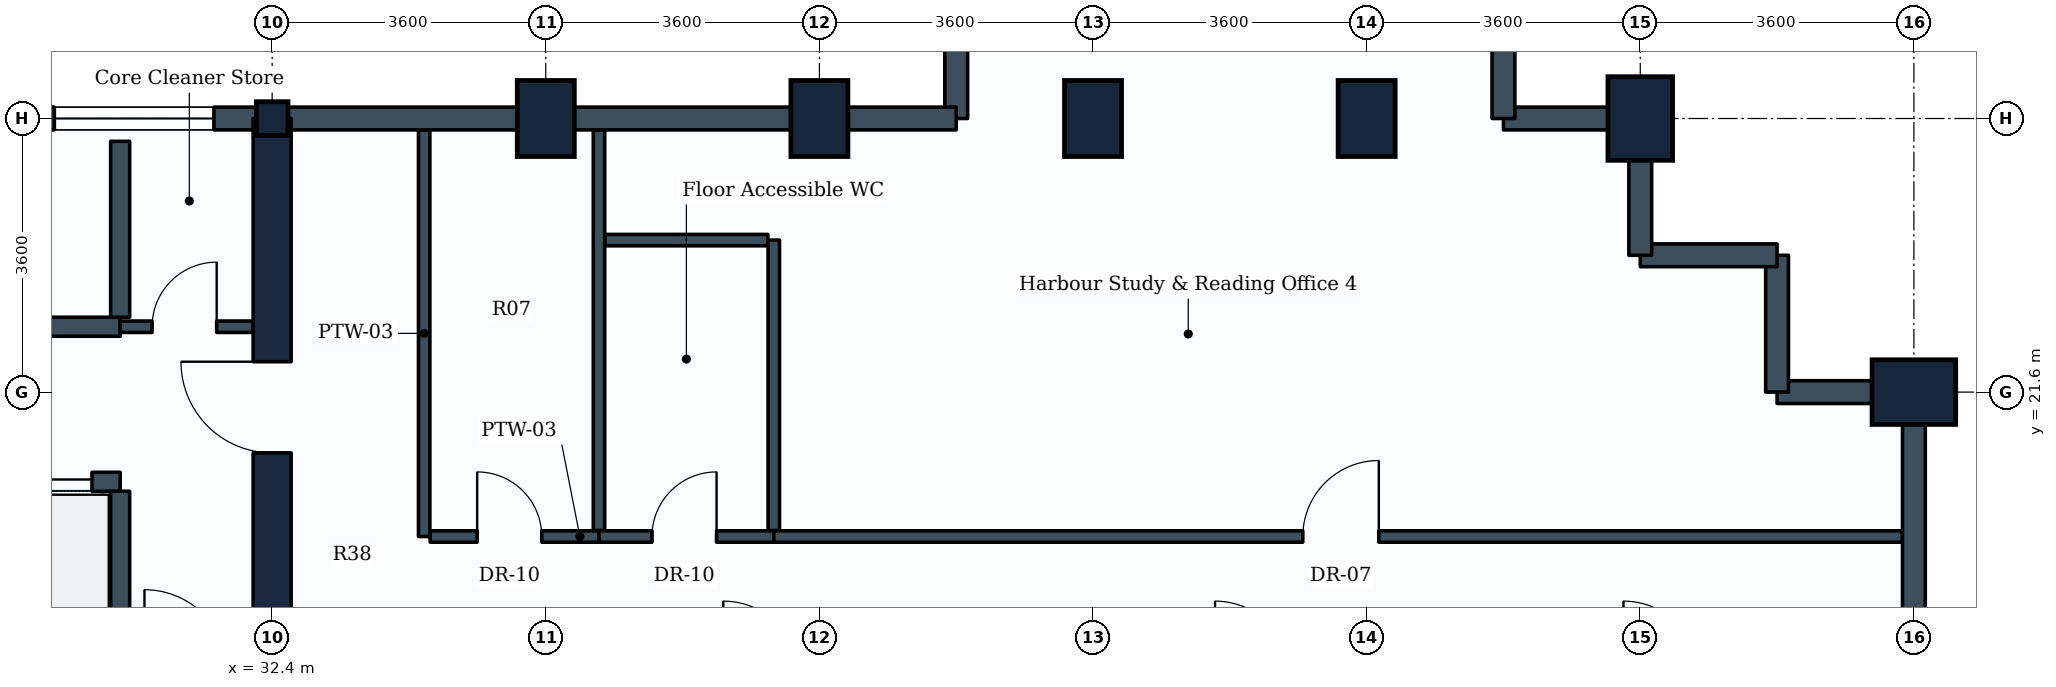
"""IFC4 building model, lengths in metres.
Left out: names, types, materials, properties, quantities, classifications, styles, units other than length and angle.
Written with IfcOpenShell. Run it as: python <this file> out.ifc"""

import sys

from ifc_helpers import new_model, si_unit, direction, frame, frame_2d, origin, origin_2d, place, context, subcontext, project, spatial, rectangle, i_section, extrude, element, fill, save


model = new_model("IFC4")
c1 = context("Model", 3, precision=1e-05, world=origin(), true_north=direction((0.0, 1.0)))
c2 = subcontext(c1, "Body", "Model", "MODEL_VIEW")
j1 = project(units=[si_unit("LENGTHUNIT", "METRE"), si_unit("PLANEANGLEUNIT", "RADIAN")], contexts=[c1])
p1 = place(None, origin())
s1 = spatial("IfcSite", under=j1, at=p1, CompositionType="ELEMENT")
p2 = place(p1, origin())
s2 = spatial("IfcBuilding", under=s1, at=p2, CompositionType="ELEMENT")
p3 = place(p2, frame((0.0, 0.0, 146.6)))
s3 = spatial("IfcBuildingStorey", under=s2, at=p3, CompositionType="ELEMENT", Elevation=146.6)
p4 = place(p3, frame((32.4, 25.2, 0.0), z_axis=(0.0, 0.0, 1.0), x_axis=(1.0, 0.0, 0.0)))
e1 = element("IfcColumn", 1, at=p4, inside=s3, PredefinedType="COLUMN", context=c2, shape_type="SweptSolid", body=[
    extrude(i_section(OverallWidth=0.416, OverallDepth=0.442, WebThickness=0.025, FlangeThickness=0.041, FilletRadius=0.015, at=origin_2d()), origin(), (0.0, 0.0, 1.0), 3.8),
])
for number, where, z_axis, x_axis in (
    (2, (36.0, 25.2, 0.0), (0.0, 0.0, 1.0), (1.0, 0.0, 0.0)),
    (3, (39.6, 25.2, 0.0), (0.0, 0.0, 1.0), (1.0, 0.0, 0.0)),
    (4, (43.2, 25.2, 0.0), (0.0, 0.0, 1.0), (1.0, 0.0, 0.0)),
    (5, (46.8, 25.2, 0.0), (0.0, 0.0, 1.0), (1.0, 0.0, 0.0)),
):
    element("IfcColumn", number, at=place(p3, frame(where, z_axis=z_axis, x_axis=x_axis)), inside=s3, PredefinedType="COLUMN", context=c2, shape_type="SweptSolid", body=[
        extrude(rectangle(XDim=0.75, YDim=1.0, at=origin_2d()), origin(), (0.0, 0.0, 1.0), 3.8),
    ])
for number, where, z_axis, x_axis in (
    (6, (50.4, 25.2, 0.0), (0.0, 0.0, 1.0), (1.0, 0.0, 0.0)),
    (7, (54.0, 21.6, 0.0), (0.0, 0.0, 1.0), (0.0, 1.0, 0.0)),
):
    element("IfcColumn", number, at=place(p3, frame(where, z_axis=z_axis, x_axis=x_axis)), inside=s3, PredefinedType="COLUMN", context=c2, shape_type="SweptSolid", body=[
        extrude(rectangle(XDim=0.85, YDim=1.1, at=origin_2d()), origin(), (0.0, 0.0, 1.0), 3.8),
    ])
p5 = place(p3, frame((54.0, 21.6, 0.0), z_axis=(0.0, 0.0, 1.0), x_axis=(0.0, -1.0, 0.0)))
e8 = element("IfcWall", 8, at=p5, inside=s3, PredefinedType="STANDARD", context=c2, shape_type="SweptSolid", body=[
    extrude(rectangle(XDim=3.6, YDim=0.3, at=frame_2d((1.8, 0.0))), origin(), (0.0, 0.0, 1.0), 2.93),
])
p6 = place(p3, frame((52.2, 21.6, 0.0), z_axis=(0.0, 0.0, 1.0), x_axis=(1.0, 0.0, 0.0)))
e9 = element("IfcWall", 9, at=p6, inside=s3, PredefinedType="STANDARD", context=c2, shape_type="SweptSolid", body=[
    extrude(rectangle(XDim=1.8, YDim=0.3, at=frame_2d((0.9, 0.0))), origin(), (0.0, 0.0, 1.0), 2.93),
])
p7 = place(p3, frame((52.2, 23.4, 0.0), z_axis=(0.0, 0.0, 1.0), x_axis=(0.0, -1.0, 0.0)))
e10 = element("IfcWall", 10, at=p7, inside=s3, PredefinedType="STANDARD", context=c2, shape_type="SweptSolid", body=[
    extrude(rectangle(XDim=1.8, YDim=0.3, at=frame_2d((0.9, 0.0))), origin(), (0.0, 0.0, 1.0), 3.535),
])
p8 = place(p3, frame((50.4, 23.4, 0.0), z_axis=(0.0, 0.0, 1.0), x_axis=(1.0, 0.0, 0.0)))
e11 = element("IfcWall", 11, at=p8, inside=s3, PredefinedType="STANDARD", context=c2, shape_type="SweptSolid", body=[
    extrude(rectangle(XDim=1.8, YDim=0.3, at=frame_2d((0.9, 0.0))), origin(), (0.0, 0.0, 1.0), 3.535),
])
p9 = place(p3, frame((50.4, 25.2, 0.0), z_axis=(0.0, 0.0, 1.0), x_axis=(0.0, -1.0, 0.0)))
e12 = element("IfcWall", 12, at=p9, inside=s3, PredefinedType="STANDARD", context=c2, shape_type="SweptSolid", body=[
    extrude(rectangle(XDim=1.8, YDim=0.3, at=frame_2d((0.9, 0.0))), origin(), (0.0, 0.0, 1.0), 2.93),
])
p10 = place(p3, frame((48.6, 25.2, 0.0), z_axis=(0.0, 0.0, 1.0), x_axis=(1.0, 0.0, 0.0)))
e13 = element("IfcWall", 13, at=p10, inside=s3, PredefinedType="STANDARD", context=c2, shape_type="SweptSolid", body=[
    extrude(rectangle(XDim=1.8, YDim=0.3, at=frame_2d((0.9, 0.0))), origin(), (0.0, 0.0, 1.0), 2.93),
])
for number, where, z_axis, x_axis in (
    (14, (48.6, 27.3, 0.0), (0.0, 0.0, 1.0), (0.0, -1.0, 0.0)),
    (15, (41.4, 27.3, 0.0), (0.0, 0.0, 1.0), (0.0, -1.0, 0.0)),
):
    element("IfcWall", number, at=place(p3, frame(where, z_axis=z_axis, x_axis=x_axis)), inside=s3, PredefinedType="STANDARD", context=c2, shape_type="SweptSolid", body=[
        extrude(rectangle(XDim=2.1, YDim=0.3, at=frame_2d((1.05, 0.0))), origin(), (0.0, 0.0, 1.0), 2.93),
    ])
p11 = place(p3, frame((39.6, 25.2, 0.0), z_axis=(0.0, 0.0, 1.0), x_axis=(1.0, 0.0, 0.0)))
e16 = element("IfcWall", 16, at=p11, inside=s3, PredefinedType="STANDARD", context=c2, shape_type="SweptSolid", body=[
    extrude(rectangle(XDim=1.8, YDim=0.3, at=frame_2d((0.9, 0.0))), origin(), (0.0, 0.0, 1.0), 2.93),
])
for number, where, z_axis, x_axis in (
    (17, (36.0, 25.2, 0.0), (0.0, 0.0, 1.0), (1.0, 0.0, 0.0)),
    (18, (32.4, 25.2, 0.0), (0.0, 0.0, 1.0), (1.0, 0.0, 0.0)),
):
    element("IfcWall", number, at=place(p3, frame(where, z_axis=z_axis, x_axis=x_axis)), inside=s3, PredefinedType="STANDARD", context=c2, shape_type="SweptSolid", body=[
        extrude(rectangle(XDim=3.6, YDim=0.3, at=frame_2d((1.8, 0.0))), origin(), (0.0, 0.0, 1.0), 2.93),
    ])
p12 = place(p3, frame((28.8, 25.2, 0.0), z_axis=(0.0, 0.0, 1.0), x_axis=(1.0, 0.0, 0.0)))
e19 = element("IfcWall", 19, at=p12, inside=s3, PredefinedType="STANDARD", context=c2, shape_type="SweptSolid", body=[
    extrude(rectangle(XDim=3.6, YDim=0.3, at=frame_2d((1.8, 0.0))), origin(), (0.0, 0.0, 1.0), 3.535),
])
p13 = place(p12, frame((0.734, 0.0, 0.85)))
e20 = element("IfcOpeningElement", 20, at=p13, cuts=e19, PredefinedType="OPENING", context=c2, shape_type="SweptSolid", body=[
    extrude(rectangle(XDim=2.1, YDim=1.35, at=frame_2d((1.05, 0.675))), frame((0.0, 0.16, 0.0), z_axis=(0.0, -1.0, 0.0), x_axis=(1.0, 0.0, 0.0)), (0.0, 0.0, 1.0), 0.32),
])
p14 = place(p3, frame((32.4, 10.8, 0.0), z_axis=(0.0, 0.0, 1.0), x_axis=(0.0, 1.0, 0.0)))
e21 = element("IfcWall", 21, at=p14, inside=s3, PredefinedType="SHEAR", context=c2, shape_type="SweptSolid", body=[
    extrude(rectangle(XDim=14.4, YDim=0.5, at=frame_2d((7.2, 0.0))), origin(), (0.0, 0.0, 1.0), 3.55),
])
p15 = place(p14, frame((4.35, 0.0, 0.0)))
e22 = element("IfcOpeningElement", 22, at=p15, cuts=e21, PredefinedType="OPENING", context=c2, shape_type="SweptSolid", body=[
    extrude(rectangle(XDim=1.2, YDim=2.1, at=frame_2d((0.6, 1.05))), frame((0.0, 0.26, 0.0), z_axis=(0.0, -1.0, 0.0), x_axis=(1.0, 0.0, 0.0)), (0.0, 0.0, 1.0), 0.52),
])
p16 = place(p14, frame((10.0, 0.0, 0.0)))
e23 = element("IfcOpeningElement", 23, at=p16, cuts=e21, PredefinedType="OPENING", context=c2, shape_type="SweptSolid", body=[
    extrude(rectangle(XDim=1.2, YDim=2.1, at=frame_2d((0.6, 1.05))), frame((0.0, 0.26, 0.0), z_axis=(0.0, -1.0, 0.0), x_axis=(1.0, 0.0, 0.0)), (0.0, 0.0, 1.0), 0.52),
])
p17 = place(p3, frame((23.18, 20.42, 0.0), z_axis=(0.0, 0.0, 1.0), x_axis=(1.0, 0.0, 0.0)))
e24 = element("IfcWall", 24, at=p17, inside=s3, PredefinedType="PARTITIONING", context=c2, shape_type="SweptSolid", body=[
    extrude(rectangle(XDim=7.22, YDim=0.25, at=frame_2d((3.61, 0.0))), origin(), (0.0, 0.0, 1.0), 3.535),
])
p18 = place(p17, frame((0.41, 0.0, 0.0)))
e25 = element("IfcOpeningElement", 25, at=p18, cuts=e24, PredefinedType="OPENING", context=c2, shape_type="SweptSolid", body=[
    extrude(rectangle(XDim=1.1, YDim=2.1, at=frame_2d((0.55, 1.05))), frame((0.0, 0.135, 0.0), z_axis=(0.0, -1.0, 0.0), x_axis=(1.0, 0.0, 0.0)), (0.0, 0.0, 1.0), 0.27),
])
p19 = place(p17, frame((2.19, 0.0, 0.0)))
e26 = element("IfcOpeningElement", 26, at=p19, cuts=e24, PredefinedType="OPENING", context=c2, shape_type="SweptSolid", body=[
    extrude(rectangle(XDim=1.1, YDim=2.1, at=frame_2d((0.55, 1.05))), frame((0.0, 0.135, 0.0), z_axis=(0.0, -1.0, 0.0), x_axis=(1.0, 0.0, 0.0)), (0.0, 0.0, 1.0), 0.27),
])
p20 = place(p17, frame((3.97, 0.0, 0.0)))
e27 = element("IfcOpeningElement", 27, at=p20, cuts=e24, PredefinedType="OPENING", context=c2, shape_type="SweptSolid", body=[
    extrude(rectangle(XDim=1.1, YDim=2.1, at=frame_2d((0.55, 1.05))), frame((0.0, 0.135, 0.0), z_axis=(0.0, -1.0, 0.0), x_axis=(1.0, 0.0, 0.0)), (0.0, 0.0, 1.0), 0.27),
])
p21 = place(p17, frame((5.75, 0.0, 0.0)))
e28 = element("IfcOpeningElement", 28, at=p21, cuts=e24, PredefinedType="OPENING", context=c2, shape_type="SweptSolid", body=[
    extrude(rectangle(XDim=1.1, YDim=2.1, at=frame_2d((0.55, 1.05))), frame((0.0, 0.135, 0.0), z_axis=(0.0, -1.0, 0.0), x_axis=(1.0, 0.0, 0.0)), (0.0, 0.0, 1.0), 0.27),
])
p22 = place(p3, frame((30.4, 18.025, 0.0), z_axis=(0.0, 0.0, 1.0), x_axis=(0.0, 1.0, 0.0)))
e29 = element("IfcWall", 29, at=p22, inside=s3, PredefinedType="PARTITIONING", context=c2, shape_type="SweptSolid", body=[
    extrude(rectangle(XDim=2.27, YDim=0.25, at=frame_2d((1.135, 0.0))), origin(), (0.0, 0.0, 1.0), 3.535),
])
p23 = place(p3, frame((23.18, 22.46, 0.0), z_axis=(0.0, 0.0, 1.0), x_axis=(1.0, 0.0, 0.0)))
e30 = element("IfcWall", 30, at=p23, inside=s3, PredefinedType="PARTITIONING", context=c2, shape_type="SweptSolid", body=[
    extrude(rectangle(XDim=7.22, YDim=0.25, at=frame_2d((3.61, 0.0))), origin(), (0.0, 0.0, 1.0), 3.535),
])
p24 = place(p3, frame((30.4, 22.585, 0.0), z_axis=(0.0, 0.0, 1.0), x_axis=(0.0, 1.0, 0.0)))
e31 = element("IfcWall", 31, at=p24, inside=s3, PredefinedType="PARTITIONING", context=c2, shape_type="SweptSolid", body=[
    extrude(rectangle(XDim=2.315, YDim=0.25, at=frame_2d((1.157, 0.0))), origin(), (0.0, 0.0, 1.0), 3.535),
])
p25 = place(p3, frame((30.4, 22.46, 0.0), z_axis=(0.0, 0.0, 1.0), x_axis=(1.0, 0.0, 0.0)))
e32 = element("IfcWall", 32, at=p25, inside=s3, PredefinedType="PARTITIONING", context=c2, shape_type="SweptSolid", body=[
    extrude(rectangle(XDim=1.75, YDim=0.15, at=frame_2d((0.875, 0.0))), origin(), (0.0, 0.0, 1.0), 3.535),
])
p26 = place(p25, frame((0.42, 0.0, 0.0)))
e33 = element("IfcOpeningElement", 33, at=p26, cuts=e32, PredefinedType="OPENING", context=c2, shape_type="SweptSolid", body=[
    extrude(rectangle(XDim=0.85, YDim=2.1, at=frame_2d((0.425, 1.05))), frame((0.0, 0.085, 0.0), z_axis=(0.0, -1.0, 0.0), x_axis=(1.0, 0.0, 0.0)), (0.0, 0.0, 1.0), 0.17),
])
p27 = place(p3, frame((34.4, 19.7, 0.0), z_axis=(0.0, 0.0, 1.0), x_axis=(0.0, 1.0, 0.0)))
e34 = element("IfcWall", 34, at=p27, inside=s3, PredefinedType="PARTITIONING", context=c2, shape_type="SweptSolid", body=[
    extrude(rectangle(XDim=5.346, YDim=0.15, at=frame_2d((2.673, 0.0))), origin(), (0.0, 0.0, 1.0), 2.93),
])
p28 = place(p3, frame((34.479, 19.7, 0.0), z_axis=(0.0, 0.0, 1.0), x_axis=(1.0, 0.0, 0.0)))
e35 = element("IfcWall", 35, at=p28, inside=s3, PredefinedType="PARTITIONING", context=c2, shape_type="SweptSolid", body=[
    extrude(rectangle(XDim=2.221, YDim=0.15, at=frame_2d((1.11, 0.0))), origin(), (0.0, 0.0, 1.0), 3.22),
])
p29 = place(p28, frame((0.618, 0.0, 0.0)))
e36 = element("IfcOpeningElement", 36, at=p29, cuts=e35, PredefinedType="OPENING", context=c2, shape_type="SweptSolid", body=[
    extrude(rectangle(XDim=0.85, YDim=2.1, at=frame_2d((0.425, 1.05))), frame((0.0, 0.085, 0.0), z_axis=(0.0, -1.0, 0.0), x_axis=(1.0, 0.0, 0.0)), (0.0, 0.0, 1.0), 0.17),
])
p30 = place(p3, frame((36.7, 19.779, 0.0), z_axis=(0.0, 0.0, 1.0), x_axis=(0.0, 1.0, 0.0)))
e37 = element("IfcWall", 37, at=p30, inside=s3, PredefinedType="PARTITIONING", context=c2, shape_type="SweptSolid", body=[
    extrude(rectangle(XDim=5.267, YDim=0.15, at=frame_2d((2.633, 0.0))), origin(), (0.0, 0.0, 1.0), 2.93),
])
p31 = place(p3, frame((36.7, 19.7, 0.0), z_axis=(0.0, 0.0, 1.0), x_axis=(1.0, 0.0, 0.0)))
e38 = element("IfcWall", 38, at=p31, inside=s3, PredefinedType="PARTITIONING", context=c2, shape_type="SweptSolid", body=[
    extrude(rectangle(XDim=2.3, YDim=0.15, at=frame_2d((1.15, 0.0))), origin(), (0.0, 0.0, 1.0), 3.535),
])
p32 = place(p31, frame((0.697, 0.0, 0.0)))
e39 = element("IfcOpeningElement", 39, at=p32, cuts=e38, PredefinedType="OPENING", context=c2, shape_type="SweptSolid", body=[
    extrude(rectangle(XDim=0.85, YDim=2.1, at=frame_2d((0.425, 1.05))), frame((0.0, 0.085, 0.0), z_axis=(0.0, -1.0, 0.0), x_axis=(1.0, 0.0, 0.0)), (0.0, 0.0, 1.0), 0.17),
])
p33 = place(p3, frame((39.0, 19.779, 0.0), z_axis=(0.0, 0.0, 1.0), x_axis=(0.0, 1.0, 0.0)))
e40 = element("IfcWall", 40, at=p33, inside=s3, PredefinedType="PARTITIONING", context=c2, shape_type="SweptSolid", body=[
    extrude(rectangle(XDim=3.821, YDim=0.15, at=frame_2d((1.911, 0.0))), origin(), (0.0, 0.0, 1.0), 3.08),
])
p34 = place(p3, frame((36.779, 23.6, 0.0), z_axis=(0.0, 0.0, 1.0), x_axis=(1.0, 0.0, 0.0)))
e41 = element("IfcWall", 41, at=p34, inside=s3, PredefinedType="PARTITIONING", context=c2, shape_type="SweptSolid", body=[
    extrude(rectangle(XDim=2.142, YDim=0.15, at=frame_2d((1.071, 0.0))), origin(), (0.0, 0.0, 1.0), 3.535),
])
p35 = place(p3, frame((39.0, 19.7, 0.0), z_axis=(0.0, 0.0, 1.0), x_axis=(1.0, 0.0, 0.0)))
e42 = element("IfcWall", 42, at=p35, inside=s3, PredefinedType="PARTITIONING", context=c2, shape_type="SweptSolid", body=[
    extrude(rectangle(XDim=14.846, YDim=0.15, at=frame_2d((7.423, 0.0))), origin(), (0.0, 0.0, 1.0), 2.93),
])
p36 = place(p35, frame((6.96, 0.0, 0.0)))
e43 = element("IfcOpeningElement", 43, at=p36, cuts=e42, PredefinedType="OPENING", context=c2, shape_type="SweptSolid", body=[
    extrude(rectangle(XDim=1.0, YDim=2.1, at=frame_2d((0.5, 1.05))), frame((0.0, 0.085, 0.0), z_axis=(0.0, -1.0, 0.0), x_axis=(1.0, 0.0, 0.0)), (0.0, 0.0, 1.0), 0.17),
])
p37 = place(p13, origin())
e44 = element("IfcWindow", 44, at=p37, inside=s3, PartitioningType="SINGLE_PANEL", PredefinedType="WINDOW", context=c2, shape_type="SweptSolid", body=[
    extrude(rectangle(XDim=2.1, YDim=1.35, at=frame_2d((1.05, 0.675))), frame((0.0, 0.03, 0.0), z_axis=(0.0, -1.0, 0.0), x_axis=(1.0, 0.0, 0.0)), (0.0, 0.0, 1.0), 0.06),
])
fill(e20, e44)
p38 = place(p21, origin())
e45 = element("IfcDoor", 45, at=p38, inside=s3, OperationType="SLIDING_TO_LEFT", PredefinedType="DOOR", context=c2, shape_type="SweptSolid", body=[
    extrude(rectangle(XDim=1.1, YDim=2.1, at=frame_2d((0.55, 1.05))), frame((0.0, 0.025, 0.0), z_axis=(0.0, -1.0, 0.0), x_axis=(1.0, 0.0, 0.0)), (0.0, 0.0, 1.0), 0.05),
])
fill(e28, e45)
p39 = place(p16, origin())
e46 = element("IfcDoor", 46, at=p39, inside=s3, OperationType="SINGLE_SWING_RIGHT", PredefinedType="DOOR", context=c2, shape_type="SweptSolid", body=[
    extrude(rectangle(XDim=1.2, YDim=2.1, at=frame_2d((0.6, 1.05))), frame((0.0, 0.025, 0.0), z_axis=(0.0, -1.0, 0.0), x_axis=(1.0, 0.0, 0.0)), (0.0, 0.0, 1.0), 0.05),
])
fill(e23, e46)
p40 = place(p26, origin())
e47 = element("IfcDoor", 47, at=p40, inside=s3, OperationType="SINGLE_SWING_RIGHT", PredefinedType="DOOR", context=c2, shape_type="SweptSolid", body=[
    extrude(rectangle(XDim=0.85, YDim=2.1, at=frame_2d((0.425, 1.05))), frame((0.0, 0.025, 0.0), z_axis=(0.0, -1.0, 0.0), x_axis=(1.0, 0.0, 0.0)), (0.0, 0.0, 1.0), 0.05),
])
fill(e33, e47)
p41 = place(p29, origin())
e48 = element("IfcDoor", 48, at=p41, inside=s3, OperationType="SINGLE_SWING_LEFT", PredefinedType="DOOR", context=c2, shape_type="SweptSolid", body=[
    extrude(rectangle(XDim=0.85, YDim=2.1, at=frame_2d((0.425, 1.05))), frame((0.0, 0.025, 0.0), z_axis=(0.0, -1.0, 0.0), x_axis=(1.0, 0.0, 0.0)), (0.0, 0.0, 1.0), 0.05),
])
fill(e36, e48)
p42 = place(p32, origin())
e49 = element("IfcDoor", 49, at=p42, inside=s3, OperationType="SINGLE_SWING_RIGHT", PredefinedType="DOOR", context=c2, shape_type="SweptSolid", body=[
    extrude(rectangle(XDim=0.85, YDim=2.1, at=frame_2d((0.425, 1.05))), frame((0.0, 0.025, 0.0), z_axis=(0.0, -1.0, 0.0), x_axis=(1.0, 0.0, 0.0)), (0.0, 0.0, 1.0), 0.05),
])
fill(e39, e49)
p43 = place(p36, origin())
e50 = element("IfcDoor", 50, at=p43, inside=s3, OperationType="SINGLE_SWING_RIGHT", PredefinedType="DOOR", context=c2, shape_type="SweptSolid", body=[
    extrude(rectangle(XDim=1.0, YDim=2.1, at=frame_2d((0.5, 1.05))), frame((0.0, 0.025, 0.0), z_axis=(0.0, -1.0, 0.0), x_axis=(1.0, 0.0, 0.0)), (0.0, 0.0, 1.0), 0.05),
])
fill(e43, e50)
save(model, sys.argv[1])
